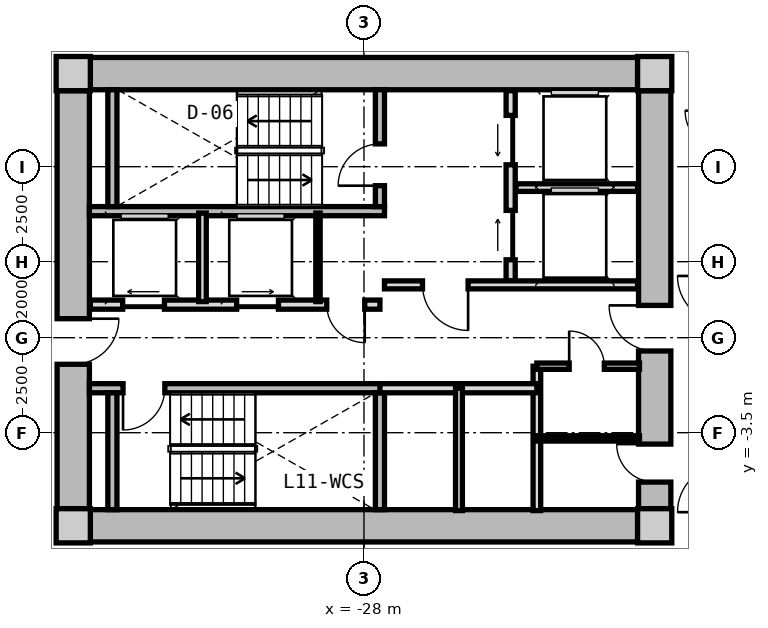
"""IFC4 building model, lengths in metres.
Left out: names, types, materials, properties, quantities, classifications, styles, units other than length and angle.
Written with IfcOpenShell. Run it as: python <this file> out.ifc"""

import sys

from ifc_helpers import new_model, si_unit, direction, frame, frame_2d, origin, origin_2d, place, context, subcontext, project, spatial, rectangle, extrude, source, transform, mapped, element, fill, save


model = new_model("IFC4")
c1 = context("Model", 3, precision=1e-05, world=origin(), true_north=direction((0.0, 1.0)))
c2 = subcontext(c1, "Body", "Model", "MODEL_VIEW")
j1 = project(units=[si_unit("LENGTHUNIT", "METRE"), si_unit("PLANEANGLEUNIT", "RADIAN")], contexts=[c1])
p1 = place(None, origin())
s1 = spatial("IfcSite", under=j1, at=p1, CompositionType="ELEMENT")
p2 = place(p1, origin())
s2 = spatial("IfcBuilding", under=s1, at=p2, CompositionType="ELEMENT")
p3 = place(p2, frame((0.0, 0.0, 39.9)))
s3 = spatial("IfcBuildingStorey", under=s2, at=p3, CompositionType="ELEMENT", Elevation=39.9)
m1 = source(origin(), c2, "Body", "SweptSolid", [
    extrude(rectangle(XDim=0.9, YDim=0.9, at=origin_2d()), origin(), (0.0, 0.0, 1.0), 3.05),
])
for number, where, z_axis, x_axis in (
    (1, (-35.65, -5.95, 0.0), (0.0, 0.0, 1.0), (1.0, 0.0, 0.0)),
    (2, (-20.35, -5.95, 0.0), (0.0, 0.0, 1.0), (1.0, 0.0, 0.0)),
    (3, (-20.35, 5.95, 0.0), (0.0, 0.0, 1.0), (1.0, 0.0, 0.0)),
    (4, (-35.65, 5.95, 0.0), (0.0, 0.0, 1.0), (1.0, 0.0, 0.0)),
):
    element("IfcColumn", number, at=place(p3, frame(where, z_axis=z_axis, x_axis=x_axis)), inside=s3, PredefinedType="COLUMN", context=c2, shape_type="MappedRepresentation", body=[
        mapped(m1, transform((0.0, 0.0, 0.0), x_axis=(1.0, 0.0, 0.0), y_axis=(0.0, 1.0, 0.0), z_axis=(0.0, 0.0, 1.0), scale=1.0)),
    ])
m2 = source(origin(), c2, "Body", "SweptSolid", [
    extrude(rectangle(XDim=14.4, YDim=0.85, at=frame_2d((7.2, 0.0))), origin(), (0.0, 0.0, 1.0), 2.79),
])
for number, where, z_axis, x_axis in (
    (5, (-35.2, 5.95, 0.0), (0.0, 0.0, 1.0), (1.0, 0.0, 0.0)),
    (6, (-20.8, -5.95, 0.0), (0.0, 0.0, 1.0), (-1.0, 0.0, 0.0)),
):
    element("IfcWall", number, at=place(p3, frame(where, z_axis=z_axis, x_axis=x_axis)), inside=s3, PredefinedType="SHEAR", context=c2, shape_type="MappedRepresentation", body=[
        mapped(m2, transform((0.0, 0.0, 0.0), x_axis=(1.0, 0.0, 0.0), y_axis=(0.0, 1.0, 0.0), z_axis=(0.0, 0.0, 1.0), scale=1.0)),
    ])
m3 = source(origin(), c2, "Body", "SweptSolid", [
    extrude(rectangle(XDim=11.0, YDim=0.85, at=frame_2d((5.5, 0.0))), origin(), (0.0, 0.0, 1.0), 2.79),
])
p4 = place(p3, frame((-35.65, -5.5, 0.0), z_axis=(0.0, 0.0, 1.0), x_axis=(0.0, 1.0, 0.0)))
e7 = element("IfcWall", 7, at=p4, inside=s3, PredefinedType="SHEAR", context=c2, shape_type="MappedRepresentation", body=[
    mapped(m3, transform((0.0, 0.0, 0.0), x_axis=(1.0, 0.0, 0.0), y_axis=(0.0, 1.0, 0.0), z_axis=(0.0, 0.0, 1.0), scale=1.0)),
])
p5 = place(p4, frame((3.8, 0.0, 0.0)))
e8 = element("IfcOpeningElement", 8, at=p5, cuts=e7, PredefinedType="OPENING", context=c2, shape_type="SweptSolid", body=[
    extrude(rectangle(XDim=1.2, YDim=2.15, at=frame_2d((0.6, 1.075))), frame((0.0, 0.435, 0.0), z_axis=(0.0, -1.0, 0.0), x_axis=(1.0, 0.0, 0.0)), (0.0, 0.0, 1.0), 0.87),
])
p6 = place(p3, frame((-20.35, 5.5, 0.0), z_axis=(0.0, 0.0, 1.0), x_axis=(0.0, -1.0, 0.0)))
e9 = element("IfcWall", 9, at=p6, inside=s3, PredefinedType="SHEAR", context=c2, shape_type="MappedRepresentation", body=[
    mapped(m3, transform((0.0, 0.0, 0.0), x_axis=(1.0, 0.0, 0.0), y_axis=(0.0, 1.0, 0.0), z_axis=(0.0, 0.0, 1.0), scale=1.0)),
])
p7 = place(p6, frame((5.65, 0.0, 0.0)))
e10 = element("IfcOpeningElement", 10, at=p7, cuts=e9, PredefinedType="OPENING", context=c2, shape_type="SweptSolid", body=[
    extrude(rectangle(XDim=1.2, YDim=2.15, at=frame_2d((0.6, 1.075))), frame((0.0, 0.435, 0.0), z_axis=(0.0, -1.0, 0.0), x_axis=(1.0, 0.0, 0.0)), (0.0, 0.0, 1.0), 0.87),
])
p8 = place(p6, frame((9.3, 0.0, 0.0)))
e11 = element("IfcOpeningElement", 11, at=p8, cuts=e9, PredefinedType="OPENING", context=c2, shape_type="SweptSolid", body=[
    extrude(rectangle(XDim=1.0, YDim=2.1, at=frame_2d((0.5, 1.05))), frame((0.0, 0.435, 0.0), z_axis=(0.0, -1.0, 0.0), x_axis=(1.0, 0.0, 0.0)), (0.0, 0.0, 1.0), 0.87),
])
m4 = source(origin(), c2, "Body", "SweptSolid", [
    extrude(rectangle(XDim=7.765, YDim=0.24, at=frame_2d((3.883, 0.0))), origin(), (0.0, 0.0, 1.0), 2.79),
])
p9 = place(p3, frame((-35.225, 2.33, 0.0), z_axis=(0.0, 0.0, 1.0), x_axis=(1.0, 0.0, 0.0)))
e12 = element("IfcWall", 12, at=p9, inside=s3, PredefinedType="PARTITIONING", context=c2, shape_type="MappedRepresentation", body=[
    mapped(m4, transform((0.0, 0.0, 0.0), x_axis=(1.0, 0.0, 0.0), y_axis=(0.0, 1.0, 0.0), z_axis=(0.0, 0.0, 1.0), scale=1.0)),
])
m5 = source(origin(), c2, "Body", "SweptSolid", [
    extrude(rectangle(XDim=3.075, YDim=0.24, at=frame_2d((1.538, 0.0))), origin(), (0.0, 0.0, 1.0), 2.79),
])
p10 = place(p3, frame((-34.62, 2.45, 0.0), z_axis=(0.0, 0.0, 1.0), x_axis=(0.0, 1.0, 0.0)))
e13 = element("IfcWall", 13, at=p10, inside=s3, PredefinedType="PARTITIONING", context=c2, shape_type="MappedRepresentation", body=[
    mapped(m5, transform((0.0, 0.0, 0.0), x_axis=(1.0, 0.0, 0.0), y_axis=(0.0, 1.0, 0.0), z_axis=(0.0, 0.0, 1.0), scale=1.0)),
])
p11 = place(p3, frame((-27.58, 2.45, 0.0), z_axis=(0.0, 0.0, 1.0), x_axis=(0.0, 1.0, 0.0)))
e14 = element("IfcWall", 14, at=p11, inside=s3, PredefinedType="PARTITIONING", context=c2, shape_type="MappedRepresentation", body=[
    mapped(m5, transform((0.0, 0.0, 0.0), x_axis=(1.0, 0.0, 0.0), y_axis=(0.0, 1.0, 0.0), z_axis=(0.0, 0.0, 1.0), scale=1.0)),
])
p12 = place(p11, frame((0.55, 0.0, 0.0)))
e15 = element("IfcOpeningElement", 15, at=p12, cuts=e14, PredefinedType="OPENING", context=c2, shape_type="SweptSolid", body=[
    extrude(rectangle(XDim=1.1, YDim=2.15, at=frame_2d((0.55, 1.075))), frame((0.0, 0.13, 0.0), z_axis=(0.0, -1.0, 0.0), x_axis=(1.0, 0.0, 0.0)), (0.0, 0.0, 1.0), 0.26),
])
p13 = place(p3, frame((-35.225, -2.33, 0.0), z_axis=(0.0, 0.0, 1.0), x_axis=(1.0, 0.0, 0.0)))
e16 = element("IfcWall", 16, at=p13, inside=s3, PredefinedType="PARTITIONING", context=c2, shape_type="MappedRepresentation", body=[
    mapped(m4, transform((0.0, 0.0, 0.0), x_axis=(1.0, 0.0, 0.0), y_axis=(0.0, 1.0, 0.0), z_axis=(0.0, 0.0, 1.0), scale=1.0)),
])
p14 = place(p13, frame((0.885, 0.0, 0.0)))
e17 = element("IfcOpeningElement", 17, at=p14, cuts=e16, PredefinedType="OPENING", context=c2, shape_type="SweptSolid", body=[
    extrude(rectangle(XDim=1.1, YDim=2.15, at=frame_2d((0.55, 1.075))), frame((0.0, 0.13, 0.0), z_axis=(0.0, -1.0, 0.0), x_axis=(1.0, 0.0, 0.0)), (0.0, 0.0, 1.0), 0.26),
])
for number, where, z_axis, x_axis in (
    (18, (-34.62, -5.525, 0.0), (0.0, 0.0, 1.0), (0.0, 1.0, 0.0)),
    (19, (-27.58, -5.525, 0.0), (0.0, 0.0, 1.0), (0.0, 1.0, 0.0)),
):
    element("IfcWall", number, at=place(p3, frame(where, z_axis=z_axis, x_axis=x_axis)), inside=s3, PredefinedType="PARTITIONING", context=c2, shape_type="MappedRepresentation", body=[
        mapped(m5, transform((0.0, 0.0, 0.0), x_axis=(1.0, 0.0, 0.0), y_axis=(0.0, 1.0, 0.0), z_axis=(0.0, 0.0, 1.0), scale=1.0)),
    ])
m6 = source(origin(), c2, "Body", "SweptSolid", [
    extrude(rectangle(XDim=5.0, YDim=0.24, at=frame_2d((2.5, 0.0))), origin(), (0.0, 0.0, 1.0), 2.775),
])
p15 = place(p3, frame((-24.14, 0.5, 0.0), z_axis=(0.0, 0.0, 1.0), x_axis=(0.0, 1.0, 0.0)))
e20 = element("IfcWall", 20, at=p15, inside=s3, PredefinedType="PARTITIONING", context=c2, shape_type="MappedRepresentation", body=[
    mapped(m6, transform((0.0, 0.0, 0.0), x_axis=(1.0, 0.0, 0.0), y_axis=(0.0, 1.0, 0.0), z_axis=(0.0, 0.0, 1.0), scale=1.0)),
])
p16 = place(p15, frame((3.05, 0.0, 0.0)))
e21 = element("IfcOpeningElement", 21, at=p16, cuts=e20, PredefinedType="OPENING", context=c2, shape_type="SweptSolid", body=[
    extrude(rectangle(XDim=1.3, YDim=2.2, at=frame_2d((0.65, 1.1))), frame((0.0, 0.13, 0.0), z_axis=(0.0, -1.0, 0.0), x_axis=(1.0, 0.0, 0.0)), (0.0, 0.0, 1.0), 0.26),
])
p17 = place(p15, frame((0.55, 0.0, 0.0)))
e22 = element("IfcOpeningElement", 22, at=p17, cuts=e20, PredefinedType="OPENING", context=c2, shape_type="SweptSolid", body=[
    extrude(rectangle(XDim=1.3, YDim=2.2, at=frame_2d((0.65, 1.1))), frame((0.0, 0.13, 0.0), z_axis=(0.0, -1.0, 0.0), x_axis=(1.0, 0.0, 0.0)), (0.0, 0.0, 1.0), 0.26),
])
m7 = source(origin(), c2, "Body", "SweptSolid", [
    extrude(rectangle(XDim=3.2, YDim=0.2, at=frame_2d((1.6, 0.0))), origin(), (0.0, 0.0, 1.0), 2.775),
])
p18 = place(p3, frame((-24.0, 2.95, 0.0), z_axis=(0.0, 0.0, 1.0), x_axis=(1.0, 0.0, 0.0)))
e23 = element("IfcWall", 23, at=p18, inside=s3, PredefinedType="PARTITIONING", context=c2, shape_type="MappedRepresentation", body=[
    mapped(m7, transform((0.0, 0.0, 0.0), x_axis=(1.0, 0.0, 0.0), y_axis=(0.0, 1.0, 0.0), z_axis=(0.0, 0.0, 1.0), scale=1.0)),
])
m8 = source(origin(), c2, "Body", "SweptSolid", [
    extrude(rectangle(XDim=6.66, YDim=0.21, at=frame_2d((3.33, 0.0))), origin(), (0.0, 0.0, 1.0), 2.775),
])
p19 = place(p3, frame((-27.46, 0.39, 0.0), z_axis=(0.0, 0.0, 1.0), x_axis=(1.0, 0.0, 0.0)))
e24 = element("IfcWall", 24, at=p19, inside=s3, PredefinedType="PARTITIONING", context=c2, shape_type="MappedRepresentation", body=[
    mapped(m8, transform((0.0, 0.0, 0.0), x_axis=(1.0, 0.0, 0.0), y_axis=(0.0, 1.0, 0.0), z_axis=(0.0, 0.0, 1.0), scale=1.0)),
])
p20 = place(p19, frame((1.0, 0.0, 0.0)))
e25 = element("IfcOpeningElement", 25, at=p20, cuts=e24, PredefinedType="OPENING", context=c2, shape_type="SweptSolid", body=[
    extrude(rectangle(XDim=1.2, YDim=2.15, at=frame_2d((0.6, 1.075))), frame((0.0, 0.115, 0.0), z_axis=(0.0, -1.0, 0.0), x_axis=(1.0, 0.0, 0.0)), (0.0, 0.0, 1.0), 0.23),
])
m9 = source(origin(), c2, "Body", "SweptSolid", [
    extrude(rectangle(XDim=7.62, YDim=0.24, at=frame_2d((3.81, 0.0))), origin(), (0.0, 0.0, 1.0), 2.775),
])
p21 = place(p3, frame((-35.2, -0.13, 0.0), z_axis=(0.0, 0.0, 1.0), x_axis=(1.0, 0.0, 0.0)))
e26 = element("IfcWall", 26, at=p21, inside=s3, PredefinedType="PARTITIONING", context=c2, shape_type="MappedRepresentation", body=[
    mapped(m9, transform((0.0, 0.0, 0.0), x_axis=(1.0, 0.0, 0.0), y_axis=(0.0, 1.0, 0.0), z_axis=(0.0, 0.0, 1.0), scale=1.0)),
])
p22 = place(p21, frame((6.22, 0.0, 0.0)))
e27 = element("IfcOpeningElement", 27, at=p22, cuts=e26, PredefinedType="OPENING", context=c2, shape_type="SweptSolid", body=[
    extrude(rectangle(XDim=1.0, YDim=2.1, at=frame_2d((0.5, 1.05))), frame((0.0, 0.13, 0.0), z_axis=(0.0, -1.0, 0.0), x_axis=(1.0, 0.0, 0.0)), (0.0, 0.0, 1.0), 0.26),
])
p23 = place(p21, frame((0.85, 0.0, 0.0)))
e28 = element("IfcOpeningElement", 28, at=p23, cuts=e26, PredefinedType="OPENING", context=c2, shape_type="SweptSolid", body=[
    extrude(rectangle(XDim=1.1, YDim=2.2, at=frame_2d((0.55, 1.1))), frame((0.0, 0.13, 0.0), z_axis=(0.0, -1.0, 0.0), x_axis=(1.0, 0.0, 0.0)), (0.0, 0.0, 1.0), 0.26),
])
p24 = place(p21, frame((3.85, 0.0, 0.0)))
e29 = element("IfcOpeningElement", 29, at=p24, cuts=e26, PredefinedType="OPENING", context=c2, shape_type="SweptSolid", body=[
    extrude(rectangle(XDim=1.1, YDim=2.2, at=frame_2d((0.55, 1.1))), frame((0.0, 0.13, 0.0), z_axis=(0.0, -1.0, 0.0), x_axis=(1.0, 0.0, 0.0)), (0.0, 0.0, 1.0), 0.26),
])
m10 = source(origin(), c2, "Body", "SweptSolid", [
    extrude(rectangle(XDim=2.33, YDim=0.115, at=frame_2d((1.165, 0.0))), origin(), (0.0, 0.0, 1.0), 2.775),
])
p25 = place(p3, frame((-29.21, -0.05, 0.0), z_axis=(0.0, 0.0, 1.0), x_axis=(0.0, 1.0, 0.0)))
e30 = element("IfcWall", 30, at=p25, inside=s3, PredefinedType="PARTITIONING", context=c2, shape_type="MappedRepresentation", body=[
    mapped(m10, transform((0.0, 0.0, 0.0), x_axis=(1.0, 0.0, 0.0), y_axis=(0.0, 1.0, 0.0), z_axis=(0.0, 0.0, 1.0), scale=1.0)),
])
m11 = source(origin(), c2, "Body", "SweptSolid", [
    extrude(rectangle(XDim=2.33, YDim=0.2, at=frame_2d((1.165, 0.0))), origin(), (0.0, 0.0, 1.0), 2.775),
])
p26 = place(p3, frame((-32.25, -0.05, 0.0), z_axis=(0.0, 0.0, 1.0), x_axis=(0.0, 1.0, 0.0)))
e31 = element("IfcWall", 31, at=p26, inside=s3, PredefinedType="PARTITIONING", context=c2, shape_type="MappedRepresentation", body=[
    mapped(m11, transform((0.0, 0.0, 0.0), x_axis=(1.0, 0.0, 0.0), y_axis=(0.0, 1.0, 0.0), z_axis=(0.0, 0.0, 1.0), scale=1.0)),
])
m12 = source(origin(), c2, "Body", "SweptSolid", [
    extrude(rectangle(XDim=3.8, YDim=0.2, at=frame_2d((1.9, 0.0))), origin(), (0.0, 0.0, 1.0), 2.775),
])
p27 = place(p3, frame((-23.45, -5.55, 0.0), z_axis=(0.0, 0.0, 1.0), x_axis=(0.0, 1.0, 0.0)))
e32 = element("IfcWall", 32, at=p27, inside=s3, PredefinedType="PARTITIONING", context=c2, shape_type="MappedRepresentation", body=[
    mapped(m12, transform((0.0, 0.0, 0.0), x_axis=(1.0, 0.0, 0.0), y_axis=(0.0, 1.0, 0.0), z_axis=(0.0, 0.0, 1.0), scale=1.0)),
])
m13 = source(origin(), c2, "Body", "SweptSolid", [
    extrude(rectangle(XDim=4.13, YDim=0.24, at=frame_2d((2.065, 0.0))), origin(), (0.0, 0.0, 1.0), 2.775),
])
p28 = place(p3, frame((-27.58, -2.33, 0.0), z_axis=(0.0, 0.0, 1.0), x_axis=(1.0, 0.0, 0.0)))
e33 = element("IfcWall", 33, at=p28, inside=s3, PredefinedType="PARTITIONING", context=c2, shape_type="MappedRepresentation", body=[
    mapped(m13, transform((0.0, 0.0, 0.0), x_axis=(1.0, 0.0, 0.0), y_axis=(0.0, 1.0, 0.0), z_axis=(0.0, 0.0, 1.0), scale=1.0)),
])
m14 = source(origin(), c2, "Body", "SweptSolid", [
    extrude(rectangle(XDim=3.22, YDim=0.18, at=frame_2d((1.61, 0.0))), origin(), (0.0, 0.0, 1.0), 2.775),
])
p29 = place(p3, frame((-25.5, -5.55, 0.0), z_axis=(0.0, 0.0, 1.0), x_axis=(0.0, 1.0, 0.0)))
e34 = element("IfcWall", 34, at=p29, inside=s3, PredefinedType="PARTITIONING", context=c2, shape_type="MappedRepresentation", body=[
    mapped(m14, transform((0.0, 0.0, 0.0), x_axis=(1.0, 0.0, 0.0), y_axis=(0.0, 1.0, 0.0), z_axis=(0.0, 0.0, 1.0), scale=1.0)),
])
m15 = source(origin(), c2, "Body", "SweptSolid", [
    extrude(rectangle(XDim=2.7, YDim=0.165, at=frame_2d((1.35, 0.0))), origin(), (0.0, 0.0, 1.0), 2.775),
])
p30 = place(p3, frame((-23.45, -1.75, 0.0), z_axis=(0.0, 0.0, 1.0), x_axis=(1.0, 0.0, 0.0)))
e35 = element("IfcWall", 35, at=p30, inside=s3, PredefinedType="PARTITIONING", context=c2, shape_type="MappedRepresentation", body=[
    mapped(m15, transform((0.0, 0.0, 0.0), x_axis=(1.0, 0.0, 0.0), y_axis=(0.0, 1.0, 0.0), z_axis=(0.0, 0.0, 1.0), scale=1.0)),
])
p31 = place(p30, frame((0.85, 0.0, 0.0)))
e36 = element("IfcOpeningElement", 36, at=p31, cuts=e35, PredefinedType="OPENING", context=c2, shape_type="SweptSolid", body=[
    extrude(rectangle(XDim=0.925, YDim=2.1, at=frame_2d((0.462, 1.05))), frame((0.0, 0.093, 0.0), z_axis=(0.0, -1.0, 0.0), x_axis=(1.0, 0.0, 0.0)), (0.0, 0.0, 1.0), 0.185),
])
m16 = source(origin(), c2, "Body", "SweptSolid", [
    extrude(rectangle(XDim=2.7, YDim=0.14, at=frame_2d((1.35, 0.0))), origin(), (0.0, 0.0, 1.0), 2.775),
])
p32 = place(p3, frame((-23.45, -3.65, 0.0), z_axis=(0.0, 0.0, 1.0), x_axis=(1.0, 0.0, 0.0)))
e37 = element("IfcWall", 37, at=p32, inside=s3, PredefinedType="PARTITIONING", context=c2, shape_type="MappedRepresentation", body=[
    mapped(m16, transform((0.0, 0.0, 0.0), x_axis=(1.0, 0.0, 0.0), y_axis=(0.0, 1.0, 0.0), z_axis=(0.0, 0.0, 1.0), scale=1.0)),
])
m17 = source(origin(), c2, "Body", "SweptSolid", [
    extrude(rectangle(XDim=1.1, YDim=2.15, at=frame_2d((0.55, 1.075))), frame((0.0, 0.025, 0.0), z_axis=(0.0, -1.0, 0.0), x_axis=(1.0, 0.0, 0.0)), (0.0, 0.0, 1.0), 0.05),
])
p33 = place(p12, origin())
e38 = element("IfcDoor", 38, at=p33, inside=s3, OperationType="SINGLE_SWING_LEFT", PredefinedType="DOOR", context=c2, shape_type="MappedRepresentation", body=[
    mapped(m17, transform((0.0, 0.0, 0.0), x_axis=(1.0, 0.0, 0.0), y_axis=(0.0, 1.0, 0.0), z_axis=(0.0, 0.0, 1.0), scale=1.0)),
])
fill(e15, e38)
p34 = place(p14, frame((1.1, 0.0, 0.0), z_axis=(0.0, 0.0, 1.0), x_axis=(-1.0, 0.0, 0.0)))
e39 = element("IfcDoor", 39, at=p34, inside=s3, OperationType="SINGLE_SWING_RIGHT", PredefinedType="DOOR", context=c2, shape_type="MappedRepresentation", body=[
    mapped(m17, transform((0.0, 0.0, 0.0), x_axis=(1.0, 0.0, 0.0), y_axis=(0.0, 1.0, 0.0), z_axis=(0.0, 0.0, 1.0), scale=1.0)),
])
fill(e17, e39)
m18 = source(origin(), c2, "Body", "SweptSolid", [
    extrude(rectangle(XDim=1.3, YDim=2.2, at=frame_2d((0.65, 1.1))), frame((0.0, 0.025, 0.0), z_axis=(0.0, -1.0, 0.0), x_axis=(1.0, 0.0, 0.0)), (0.0, 0.0, 1.0), 0.05),
])
p35 = place(p16, origin())
e40 = element("IfcDoor", 40, at=p35, inside=s3, OperationType="SLIDING_TO_LEFT", PredefinedType="DOOR", context=c2, shape_type="MappedRepresentation", body=[
    mapped(m18, transform((0.0, 0.0, 0.0), x_axis=(1.0, 0.0, 0.0), y_axis=(0.0, 1.0, 0.0), z_axis=(0.0, 0.0, 1.0), scale=1.0)),
])
fill(e21, e40)
p36 = place(p17, origin())
e41 = element("IfcDoor", 41, at=p36, inside=s3, OperationType="SLIDING_TO_RIGHT", PredefinedType="DOOR", context=c2, shape_type="MappedRepresentation", body=[
    mapped(m18, transform((0.0, 0.0, 0.0), x_axis=(1.0, 0.0, 0.0), y_axis=(0.0, 1.0, 0.0), z_axis=(0.0, 0.0, 1.0), scale=1.0)),
])
fill(e22, e41)
m19 = source(origin(), c2, "Body", "SweptSolid", [
    extrude(rectangle(XDim=1.2, YDim=2.15, at=frame_2d((0.6, 1.075))), frame((0.0, 0.025, 0.0), z_axis=(0.0, -1.0, 0.0), x_axis=(1.0, 0.0, 0.0)), (0.0, 0.0, 1.0), 0.05),
])
p37 = place(p20, frame((1.2, 0.0, 0.0), z_axis=(0.0, 0.0, 1.0), x_axis=(-1.0, 0.0, 0.0)))
e42 = element("IfcDoor", 42, at=p37, inside=s3, OperationType="SINGLE_SWING_LEFT", PredefinedType="DOOR", context=c2, shape_type="MappedRepresentation", body=[
    mapped(m19, transform((0.0, 0.0, 0.0), x_axis=(1.0, 0.0, 0.0), y_axis=(0.0, 1.0, 0.0), z_axis=(0.0, 0.0, 1.0), scale=1.0)),
])
fill(e25, e42)
p38 = place(p5, frame((1.2, 0.0, 0.0), z_axis=(0.0, 0.0, 1.0), x_axis=(-1.0, 0.0, 0.0)))
e43 = element("IfcDoor", 43, at=p38, inside=s3, OperationType="SINGLE_SWING_LEFT", PredefinedType="DOOR", context=c2, shape_type="MappedRepresentation", body=[
    mapped(m19, transform((0.0, 0.0, 0.0), x_axis=(1.0, 0.0, 0.0), y_axis=(0.0, 1.0, 0.0), z_axis=(0.0, 0.0, 1.0), scale=1.0)),
])
fill(e8, e43)
p39 = place(p7, frame((1.2, 0.0, 0.0), z_axis=(0.0, 0.0, 1.0), x_axis=(-1.0, 0.0, 0.0)))
e44 = element("IfcDoor", 44, at=p39, inside=s3, OperationType="SINGLE_SWING_RIGHT", PredefinedType="DOOR", context=c2, shape_type="MappedRepresentation", body=[
    mapped(m19, transform((0.0, 0.0, 0.0), x_axis=(1.0, 0.0, 0.0), y_axis=(0.0, 1.0, 0.0), z_axis=(0.0, 0.0, 1.0), scale=1.0)),
])
fill(e10, e44)
m20 = source(origin(), c2, "Body", "SweptSolid", [
    extrude(rectangle(XDim=1.0, YDim=2.1, at=frame_2d((0.5, 1.05))), frame((0.0, 0.025, 0.0), z_axis=(0.0, -1.0, 0.0), x_axis=(1.0, 0.0, 0.0)), (0.0, 0.0, 1.0), 0.05),
])
p40 = place(p22, frame((1.0, 0.0, 0.0), z_axis=(0.0, 0.0, 1.0), x_axis=(-1.0, 0.0, 0.0)))
e45 = element("IfcDoor", 45, at=p40, inside=s3, OperationType="SINGLE_SWING_LEFT", PredefinedType="DOOR", context=c2, shape_type="MappedRepresentation", body=[
    mapped(m20, transform((0.0, 0.0, 0.0), x_axis=(1.0, 0.0, 0.0), y_axis=(0.0, 1.0, 0.0), z_axis=(0.0, 0.0, 1.0), scale=1.0)),
])
fill(e27, e45)
m21 = source(origin(), c2, "Body", "SweptSolid", [
    extrude(rectangle(XDim=1.1, YDim=2.2, at=frame_2d((0.55, 1.1))), frame((0.0, 0.025, 0.0), z_axis=(0.0, -1.0, 0.0), x_axis=(1.0, 0.0, 0.0)), (0.0, 0.0, 1.0), 0.05),
])
p41 = place(p23, origin())
e46 = element("IfcDoor", 46, at=p41, inside=s3, OperationType="SLIDING_TO_LEFT", PredefinedType="DOOR", context=c2, shape_type="MappedRepresentation", body=[
    mapped(m21, transform((0.0, 0.0, 0.0), x_axis=(1.0, 0.0, 0.0), y_axis=(0.0, 1.0, 0.0), z_axis=(0.0, 0.0, 1.0), scale=1.0)),
])
fill(e28, e46)
p42 = place(p24, origin())
e47 = element("IfcDoor", 47, at=p42, inside=s3, OperationType="SLIDING_TO_RIGHT", PredefinedType="DOOR", context=c2, shape_type="MappedRepresentation", body=[
    mapped(m21, transform((0.0, 0.0, 0.0), x_axis=(1.0, 0.0, 0.0), y_axis=(0.0, 1.0, 0.0), z_axis=(0.0, 0.0, 1.0), scale=1.0)),
])
fill(e29, e47)
m22 = source(origin(), c2, "Body", "SweptSolid", [
    extrude(rectangle(XDim=0.925, YDim=2.1, at=frame_2d((0.462, 1.05))), frame((0.0, 0.025, 0.0), z_axis=(0.0, -1.0, 0.0), x_axis=(1.0, 0.0, 0.0)), (0.0, 0.0, 1.0), 0.05),
])
p43 = place(p31, origin())
e48 = element("IfcDoor", 48, at=p43, inside=s3, OperationType="SINGLE_SWING_LEFT", PredefinedType="DOOR", context=c2, shape_type="MappedRepresentation", body=[
    mapped(m22, transform((0.0, 0.0, 0.0), x_axis=(1.0, 0.0, 0.0), y_axis=(0.0, 1.0, 0.0), z_axis=(0.0, 0.0, 1.0), scale=1.0)),
])
fill(e36, e48)
p44 = place(p8, frame((1.0, 0.0, 0.0), z_axis=(0.0, 0.0, 1.0), x_axis=(-1.0, 0.0, 0.0)))
e49 = element("IfcDoor", 49, at=p44, inside=s3, OperationType="SINGLE_SWING_RIGHT", PredefinedType="DOOR", context=c2, shape_type="MappedRepresentation", body=[
    mapped(m20, transform((0.0, 0.0, 0.0), x_axis=(1.0, 0.0, 0.0), y_axis=(0.0, 1.0, 0.0), z_axis=(0.0, 0.0, 1.0), scale=1.0)),
])
fill(e11, e49)
save(model, sys.argv[1])
